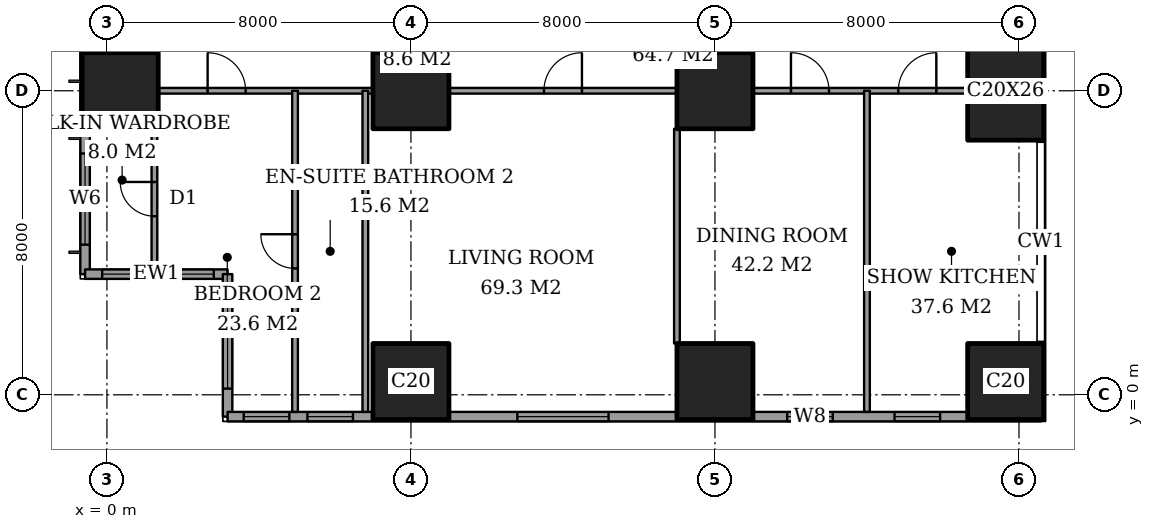
"""IFC4 building model, lengths in metres.
Left out: names, types, materials, properties, quantities, classifications, styles, units other than length and angle.
Written with IfcOpenShell. Run it as: python <this file> out.ifc"""

import sys

from ifc_helpers import new_model, si_unit, direction, frame, frame_2d, origin, origin_2d, place, context, subcontext, project, spatial, rectangle, extrude, element, fill, save


model = new_model("IFC4")
c1 = context("Model", 3, precision=1e-05, world=origin(), true_north=direction((0.0, 1.0)))
c2 = subcontext(c1, "Body", "Model", "MODEL_VIEW")
j1 = project(units=[si_unit("LENGTHUNIT", "METRE"), si_unit("PLANEANGLEUNIT", "RADIAN")], contexts=[c1])
p1 = place(None, origin())
s1 = spatial("IfcSite", under=j1, at=p1, CompositionType="ELEMENT")
p2 = place(p1, origin())
s2 = spatial("IfcBuilding", under=s1, at=p2, CompositionType="ELEMENT")
p3 = place(p2, frame((0.0, 0.0, 83.6)))
s3 = spatial("IfcBuildingStorey", under=s2, at=p3, CompositionType="ELEMENT", Elevation=83.6)
for number, where, z_axis, x_axis in (
    (1, (0.35, 8.0, 0.0), (0.0, 0.0, 1.0), (1.0, 0.0, 0.0)),
    (2, (8.0, 0.35, 0.0), (0.0, 0.0, 1.0), (1.0, 0.0, 0.0)),
    (3, (8.0, 8.0, 0.0), (0.0, 0.0, 1.0), (1.0, 0.0, 0.0)),
    (4, (16.0, 0.35, 0.0), (0.0, 0.0, 1.0), (1.0, 0.0, 0.0)),
    (5, (16.0, 8.0, 0.0), (0.0, 0.0, 1.0), (1.0, 0.0, 0.0)),
    (6, (23.65, 0.35, 0.0), (0.0, 0.0, 1.0), (1.0, 0.0, 0.0)),
):
    element("IfcColumn", number, at=place(p3, frame(where, z_axis=z_axis, x_axis=x_axis)), inside=s3, PredefinedType="COLUMN", context=c2, shape_type="SweptSolid", body=[
        extrude(rectangle(XDim=2.0, YDim=2.0, at=origin_2d()), origin(), (0.0, 0.0, 1.0), 3.6),
    ])
p4 = place(p3, frame((23.65, 8.0, 0.0), z_axis=(0.0, 0.0, 1.0), x_axis=(1.0, 0.0, 0.0)))
e7 = element("IfcColumn", 7, at=p4, inside=s3, PredefinedType="COLUMN", context=c2, shape_type="SweptSolid", body=[
    extrude(rectangle(XDim=2.0, YDim=2.6, at=origin_2d()), origin(), (0.0, 0.0, 1.0), 3.6),
])
p5 = place(p3, frame((-0.575, 44.825, 0.0), z_axis=(0.0, 0.0, 1.0), x_axis=(0.0, -1.0, 0.0)))
e8 = element("IfcWall", 8, at=p5, inside=s3, PredefinedType="SOLIDWALL", context=c2, shape_type="SweptSolid", body=[
    extrude(rectangle(XDim=41.65, YDim=0.25, at=frame_2d((20.825, 0.0))), origin(), (0.0, 0.0, 1.0), 3.6),
])
p6 = place(p5, frame((0.775, 0.0, 0.6)))
e9 = element("IfcOpeningElement", 9, at=p6, cuts=e8, PredefinedType="OPENING", context=c2, shape_type="SweptSolid", body=[
    extrude(rectangle(XDim=2.4, YDim=2.0, at=frame_2d((1.2, 1.0))), frame((0.0, 0.135, 0.0), z_axis=(0.0, -1.0, 0.0), x_axis=(1.0, 0.0, 0.0)), (0.0, 0.0, 1.0), 0.27),
])
p7 = place(p5, frame((6.1, 0.0, 0.6)))
e10 = element("IfcOpeningElement", 10, at=p7, cuts=e8, PredefinedType="OPENING", context=c2, shape_type="SweptSolid", body=[
    extrude(rectangle(XDim=1.2, YDim=2.0, at=frame_2d((0.6, 1.0))), frame((0.0, 0.135, 0.0), z_axis=(0.0, -1.0, 0.0), x_axis=(1.0, 0.0, 0.0)), (0.0, 0.0, 1.0), 0.27),
])
p8 = place(p5, frame((8.425, 0.0, 0.6)))
e11 = element("IfcOpeningElement", 11, at=p8, cuts=e8, PredefinedType="OPENING", context=c2, shape_type="SweptSolid", body=[
    extrude(rectangle(XDim=2.4, YDim=2.0, at=frame_2d((1.2, 1.0))), frame((0.0, 0.135, 0.0), z_axis=(0.0, -1.0, 0.0), x_axis=(1.0, 0.0, 0.0)), (0.0, 0.0, 1.0), 0.27),
])
p9 = place(p5, frame((15.625, 0.0, 0.6)))
e12 = element("IfcOpeningElement", 12, at=p9, cuts=e8, PredefinedType="OPENING", context=c2, shape_type="SweptSolid", body=[
    extrude(rectangle(XDim=2.4, YDim=2.0, at=frame_2d((1.2, 1.0))), frame((0.0, 0.135, 0.0), z_axis=(0.0, -1.0, 0.0), x_axis=(1.0, 0.0, 0.0)), (0.0, 0.0, 1.0), 0.27),
])
p10 = place(p5, frame((23.625, 0.0, 0.6)))
e13 = element("IfcOpeningElement", 13, at=p10, cuts=e8, PredefinedType="OPENING", context=c2, shape_type="SweptSolid", body=[
    extrude(rectangle(XDim=2.4, YDim=2.0, at=frame_2d((1.2, 1.0))), frame((0.0, 0.135, 0.0), z_axis=(0.0, -1.0, 0.0), x_axis=(1.0, 0.0, 0.0)), (0.0, 0.0, 1.0), 0.27),
])
p11 = place(p5, frame((30.825, 0.0, 0.6)))
e14 = element("IfcOpeningElement", 14, at=p11, cuts=e8, PredefinedType="OPENING", context=c2, shape_type="SweptSolid", body=[
    extrude(rectangle(XDim=2.4, YDim=2.0, at=frame_2d((1.2, 1.0))), frame((0.0, 0.135, 0.0), z_axis=(0.0, -1.0, 0.0), x_axis=(1.0, 0.0, 0.0)), (0.0, 0.0, 1.0), 0.27),
])
p12 = place(p5, frame((34.5, 0.0, 0.6)))
e15 = element("IfcOpeningElement", 15, at=p12, cuts=e8, PredefinedType="OPENING", context=c2, shape_type="SweptSolid", body=[
    extrude(rectangle(XDim=1.2, YDim=2.0, at=frame_2d((0.6, 1.0))), frame((0.0, 0.135, 0.0), z_axis=(0.0, -1.0, 0.0), x_axis=(1.0, 0.0, 0.0)), (0.0, 0.0, 1.0), 0.27),
])
p13 = place(p5, frame((38.475, 0.0, 0.6)))
e16 = element("IfcOpeningElement", 16, at=p13, cuts=e8, PredefinedType="OPENING", context=c2, shape_type="SweptSolid", body=[
    extrude(rectangle(XDim=2.4, YDim=2.0, at=frame_2d((1.2, 1.0))), frame((0.0, 0.135, 0.0), z_axis=(0.0, -1.0, 0.0), x_axis=(1.0, 0.0, 0.0)), (0.0, 0.0, 1.0), 0.27),
])
p14 = place(p3, frame((-0.575, 3.175, 0.0), z_axis=(0.0, 0.0, 1.0), x_axis=(1.0, 0.0, 0.0)))
e17 = element("IfcWall", 17, at=p14, inside=s3, PredefinedType="SOLIDWALL", context=c2, shape_type="SweptSolid", body=[
    extrude(rectangle(XDim=3.75, YDim=0.25, at=frame_2d((1.875, 0.0))), origin(), (0.0, 0.0, 1.0), 3.6),
])
p15 = place(p14, frame((0.45, 0.0, 0.6)))
e18 = element("IfcOpeningElement", 18, at=p15, cuts=e17, PredefinedType="OPENING", context=c2, shape_type="SweptSolid", body=[
    extrude(rectangle(XDim=1.2, YDim=2.0, at=frame_2d((0.6, 1.0))), frame((0.0, 0.135, 0.0), z_axis=(0.0, -1.0, 0.0), x_axis=(1.0, 0.0, 0.0)), (0.0, 0.0, 1.0), 0.27),
])
p16 = place(p14, frame((2.188, 0.0, 0.6)))
e19 = element("IfcOpeningElement", 19, at=p16, cuts=e17, PredefinedType="OPENING", context=c2, shape_type="SweptSolid", body=[
    extrude(rectangle(XDim=1.2, YDim=2.0, at=frame_2d((0.6, 1.0))), frame((0.0, 0.135, 0.0), z_axis=(0.0, -1.0, 0.0), x_axis=(1.0, 0.0, 0.0)), (0.0, 0.0, 1.0), 0.27),
])
p17 = place(p3, frame((3.175, 3.175, 0.0), z_axis=(0.0, 0.0, 1.0), x_axis=(0.0, -1.0, 0.0)))
e20 = element("IfcWall", 20, at=p17, inside=s3, PredefinedType="SOLIDWALL", context=c2, shape_type="SweptSolid", body=[
    extrude(rectangle(XDim=3.75, YDim=0.25, at=frame_2d((1.875, 0.0))), origin(), (0.0, 0.0, 1.0), 3.6),
])
p18 = place(p17, frame((0.613, 0.0, 0.6)))
e21 = element("IfcOpeningElement", 21, at=p18, cuts=e20, PredefinedType="OPENING", context=c2, shape_type="SweptSolid", body=[
    extrude(rectangle(XDim=2.4, YDim=2.0, at=frame_2d((1.2, 1.0))), frame((0.0, 0.135, 0.0), z_axis=(0.0, -1.0, 0.0), x_axis=(1.0, 0.0, 0.0)), (0.0, 0.0, 1.0), 0.27),
])
p19 = place(p3, frame((3.175, -0.575, 0.0), z_axis=(0.0, 0.0, 1.0), x_axis=(1.0, 0.0, 0.0)))
e22 = element("IfcWall", 22, at=p19, inside=s3, PredefinedType="SOLIDWALL", context=c2, shape_type="SweptSolid", body=[
    extrude(rectangle(XDim=21.4, YDim=0.25, at=frame_2d((10.7, 0.0))), origin(), (0.0, 0.0, 1.0), 3.6),
])
p20 = place(p19, frame((0.425, 0.0, 0.6)))
e23 = element("IfcOpeningElement", 23, at=p20, cuts=e22, PredefinedType="OPENING", context=c2, shape_type="SweptSolid", body=[
    extrude(rectangle(XDim=1.2, YDim=2.0, at=frame_2d((0.6, 1.0))), frame((0.0, 0.135, 0.0), z_axis=(0.0, -1.0, 0.0), x_axis=(1.0, 0.0, 0.0)), (0.0, 0.0, 1.0), 0.27),
])
p21 = place(p19, frame((2.1, 0.0, 0.6)))
e24 = element("IfcOpeningElement", 24, at=p21, cuts=e22, PredefinedType="OPENING", context=c2, shape_type="SweptSolid", body=[
    extrude(rectangle(XDim=1.2, YDim=2.0, at=frame_2d((0.6, 1.0))), frame((0.0, 0.135, 0.0), z_axis=(0.0, -1.0, 0.0), x_axis=(1.0, 0.0, 0.0)), (0.0, 0.0, 1.0), 0.27),
])
p22 = place(p19, frame((7.625, 0.0, 0.6)))
e25 = element("IfcOpeningElement", 25, at=p22, cuts=e22, PredefinedType="OPENING", context=c2, shape_type="SweptSolid", body=[
    extrude(rectangle(XDim=2.4, YDim=2.0, at=frame_2d((1.2, 1.0))), frame((0.0, 0.135, 0.0), z_axis=(0.0, -1.0, 0.0), x_axis=(1.0, 0.0, 0.0)), (0.0, 0.0, 1.0), 0.27),
])
p23 = place(p19, frame((14.725, 0.0, 0.6)))
e26 = element("IfcOpeningElement", 26, at=p23, cuts=e22, PredefinedType="OPENING", context=c2, shape_type="SweptSolid", body=[
    extrude(rectangle(XDim=1.2, YDim=2.0, at=frame_2d((0.6, 1.0))), frame((0.0, 0.135, 0.0), z_axis=(0.0, -1.0, 0.0), x_axis=(1.0, 0.0, 0.0)), (0.0, 0.0, 1.0), 0.27),
])
p24 = place(p19, frame((17.55, 0.0, 0.6)))
e27 = element("IfcOpeningElement", 27, at=p24, cuts=e22, PredefinedType="OPENING", context=c2, shape_type="SweptSolid", body=[
    extrude(rectangle(XDim=1.2, YDim=2.0, at=frame_2d((0.6, 1.0))), frame((0.0, 0.135, 0.0), z_axis=(0.0, -1.0, 0.0), x_axis=(1.0, 0.0, 0.0)), (0.0, 0.0, 1.0), 0.27),
])
p25 = place(p3, frame((1.35, 8.0, 0.0), z_axis=(0.0, 0.0, 1.0), x_axis=(1.0, 0.0, 0.0)))
e28 = element("IfcWall", 28, at=p25, inside=s3, PredefinedType="PARTITIONING", context=c2, shape_type="SweptSolid", body=[
    extrude(rectangle(XDim=5.65, YDim=0.15, at=frame_2d((2.825, 0.0))), origin(), (0.0, 0.0, 1.0), 3.35),
])
p26 = place(p25, frame((1.3, 0.0, 0.0)))
e29 = element("IfcOpeningElement", 29, at=p26, cuts=e28, PredefinedType="OPENING", context=c2, shape_type="SweptSolid", body=[
    extrude(rectangle(XDim=1.0, YDim=2.1, at=frame_2d((0.5, 1.05))), frame((0.0, 0.085, 0.0), z_axis=(0.0, -1.0, 0.0), x_axis=(1.0, 0.0, 0.0)), (0.0, 0.0, 1.0), 0.17),
])
p27 = place(p3, frame((9.0, 8.0, 0.0), z_axis=(0.0, 0.0, 1.0), x_axis=(1.0, 0.0, 0.0)))
e30 = element("IfcWall", 30, at=p27, inside=s3, PredefinedType="PARTITIONING", context=c2, shape_type="SweptSolid", body=[
    extrude(rectangle(XDim=6.0, YDim=0.15, at=frame_2d((3.0, 0.0))), origin(), (0.0, 0.0, 1.0), 3.35),
])
p28 = place(p27, frame((2.5, 0.0, 0.0)))
e31 = element("IfcOpeningElement", 31, at=p28, cuts=e30, PredefinedType="OPENING", context=c2, shape_type="SweptSolid", body=[
    extrude(rectangle(XDim=1.0, YDim=2.1, at=frame_2d((0.5, 1.05))), frame((0.0, 0.085, 0.0), z_axis=(0.0, -1.0, 0.0), x_axis=(1.0, 0.0, 0.0)), (0.0, 0.0, 1.0), 0.17),
])
p29 = place(p3, frame((17.0, 8.0, 0.0), z_axis=(0.0, 0.0, 1.0), x_axis=(1.0, 0.0, 0.0)))
e32 = element("IfcWall", 32, at=p29, inside=s3, PredefinedType="PARTITIONING", context=c2, shape_type="SweptSolid", body=[
    extrude(rectangle(XDim=5.65, YDim=0.15, at=frame_2d((2.825, 0.0))), origin(), (0.0, 0.0, 1.0), 3.35),
])
p30 = place(p29, frame((1.0, 0.0, 0.0)))
e33 = element("IfcOpeningElement", 33, at=p30, cuts=e32, PredefinedType="OPENING", context=c2, shape_type="SweptSolid", body=[
    extrude(rectangle(XDim=1.0, YDim=2.1, at=frame_2d((0.5, 1.05))), frame((0.0, 0.085, 0.0), z_axis=(0.0, -1.0, 0.0), x_axis=(1.0, 0.0, 0.0)), (0.0, 0.0, 1.0), 0.17),
])
p31 = place(p29, frame((3.825, 0.0, 0.0)))
e34 = element("IfcOpeningElement", 34, at=p31, cuts=e32, PredefinedType="OPENING", context=c2, shape_type="SweptSolid", body=[
    extrude(rectangle(XDim=1.0, YDim=2.1, at=frame_2d((0.5, 1.05))), frame((0.0, 0.085, 0.0), z_axis=(0.0, -1.0, 0.0), x_axis=(1.0, 0.0, 0.0)), (0.0, 0.0, 1.0), 0.17),
])
p32 = place(p3, frame((1.25, 3.3, 0.0), z_axis=(0.0, 0.0, 1.0), x_axis=(0.0, 1.0, 0.0)))
e35 = element("IfcWall", 35, at=p32, inside=s3, PredefinedType="PARTITIONING", context=c2, shape_type="SweptSolid", body=[
    extrude(rectangle(XDim=3.7, YDim=0.15, at=frame_2d((1.85, 0.0))), origin(), (0.0, 0.0, 1.0), 3.35),
])
p33 = place(p32, frame((1.4, 0.0, 0.0)))
e36 = element("IfcOpeningElement", 36, at=p33, cuts=e35, PredefinedType="OPENING", context=c2, shape_type="SweptSolid", body=[
    extrude(rectangle(XDim=0.9, YDim=2.1, at=frame_2d((0.45, 1.05))), frame((0.0, 0.085, 0.0), z_axis=(0.0, -1.0, 0.0), x_axis=(1.0, 0.0, 0.0)), (0.0, 0.0, 1.0), 0.17),
])
p34 = place(p3, frame((4.95, -0.45, 0.0), z_axis=(0.0, 0.0, 1.0), x_axis=(0.0, 1.0, 0.0)))
e37 = element("IfcWall", 37, at=p34, inside=s3, PredefinedType="PARTITIONING", context=c2, shape_type="SweptSolid", body=[
    extrude(rectangle(XDim=8.45, YDim=0.15, at=frame_2d((4.225, 0.0))), origin(), (0.0, 0.0, 1.0), 3.35),
])
p35 = place(p34, frame((3.775, 0.0, 0.0)))
e38 = element("IfcOpeningElement", 38, at=p35, cuts=e37, PredefinedType="OPENING", context=c2, shape_type="SweptSolid", body=[
    extrude(rectangle(XDim=0.9, YDim=2.1, at=frame_2d((0.45, 1.05))), frame((0.0, 0.085, 0.0), z_axis=(0.0, -1.0, 0.0), x_axis=(1.0, 0.0, 0.0)), (0.0, 0.0, 1.0), 0.17),
])
p36 = place(p3, frame((6.8, -0.45, 0.0), z_axis=(0.0, 0.0, 1.0), x_axis=(0.0, 1.0, 0.0)))
e39 = element("IfcWall", 39, at=p36, inside=s3, PredefinedType="PARTITIONING", context=c2, shape_type="SweptSolid", body=[
    extrude(rectangle(XDim=8.45, YDim=0.15, at=frame_2d((4.225, 0.0))), origin(), (0.0, 0.0, 1.0), 3.35),
])
p37 = place(p3, frame((15.0, 1.35, 0.0), z_axis=(0.0, 0.0, 1.0), x_axis=(0.0, 1.0, 0.0)))
e40 = element("IfcWall", 40, at=p37, inside=s3, PredefinedType="PARTITIONING", context=c2, shape_type="SweptSolid", body=[
    extrude(rectangle(XDim=5.65, YDim=0.15, at=frame_2d((2.825, 0.0))), origin(), (0.0, 0.0, 1.0), 3.35),
])
p38 = place(p3, frame((20.0, -0.45, 0.0), z_axis=(0.0, 0.0, 1.0), x_axis=(0.0, 1.0, 0.0)))
e41 = element("IfcWall", 41, at=p38, inside=s3, PredefinedType="PARTITIONING", context=c2, shape_type="SweptSolid", body=[
    extrude(rectangle(XDim=8.45, YDim=0.15, at=frame_2d((4.225, 0.0))), origin(), (0.0, 0.0, 1.0), 3.35),
])
p39 = place(p13, origin())
e42 = element("IfcWindow", 42, at=p39, inside=s3, PartitioningType="SINGLE_PANEL", PredefinedType="WINDOW", context=c2, shape_type="SweptSolid", body=[
    extrude(rectangle(XDim=2.4, YDim=2.0, at=frame_2d((1.2, 1.0))), frame((0.0, 0.03, 0.0), z_axis=(0.0, -1.0, 0.0), x_axis=(1.0, 0.0, 0.0)), (0.0, 0.0, 1.0), 0.06),
])
fill(e16, e42)
p40 = place(p15, origin())
e43 = element("IfcWindow", 43, at=p40, inside=s3, PartitioningType="SINGLE_PANEL", PredefinedType="WINDOW", context=c2, shape_type="SweptSolid", body=[
    extrude(rectangle(XDim=1.2, YDim=2.0, at=frame_2d((0.6, 1.0))), frame((0.0, 0.03, 0.0), z_axis=(0.0, -1.0, 0.0), x_axis=(1.0, 0.0, 0.0)), (0.0, 0.0, 1.0), 0.06),
])
fill(e18, e43)
p41 = place(p16, origin())
e44 = element("IfcWindow", 44, at=p41, inside=s3, PartitioningType="SINGLE_PANEL", PredefinedType="WINDOW", context=c2, shape_type="SweptSolid", body=[
    extrude(rectangle(XDim=1.2, YDim=2.0, at=frame_2d((0.6, 1.0))), frame((0.0, 0.03, 0.0), z_axis=(0.0, -1.0, 0.0), x_axis=(1.0, 0.0, 0.0)), (0.0, 0.0, 1.0), 0.06),
])
fill(e19, e44)
p42 = place(p18, origin())
e45 = element("IfcWindow", 45, at=p42, inside=s3, PartitioningType="SINGLE_PANEL", PredefinedType="WINDOW", context=c2, shape_type="SweptSolid", body=[
    extrude(rectangle(XDim=2.4, YDim=2.0, at=frame_2d((1.2, 1.0))), frame((0.0, 0.03, 0.0), z_axis=(0.0, -1.0, 0.0), x_axis=(1.0, 0.0, 0.0)), (0.0, 0.0, 1.0), 0.06),
])
fill(e21, e45)
p43 = place(p20, origin())
e46 = element("IfcWindow", 46, at=p43, inside=s3, PartitioningType="SINGLE_PANEL", PredefinedType="WINDOW", context=c2, shape_type="SweptSolid", body=[
    extrude(rectangle(XDim=1.2, YDim=2.0, at=frame_2d((0.6, 1.0))), frame((0.0, 0.03, 0.0), z_axis=(0.0, -1.0, 0.0), x_axis=(1.0, 0.0, 0.0)), (0.0, 0.0, 1.0), 0.06),
])
fill(e23, e46)
p44 = place(p21, origin())
e47 = element("IfcWindow", 47, at=p44, inside=s3, PartitioningType="SINGLE_PANEL", PredefinedType="WINDOW", context=c2, shape_type="SweptSolid", body=[
    extrude(rectangle(XDim=1.2, YDim=2.0, at=frame_2d((0.6, 1.0))), frame((0.0, 0.03, 0.0), z_axis=(0.0, -1.0, 0.0), x_axis=(1.0, 0.0, 0.0)), (0.0, 0.0, 1.0), 0.06),
])
fill(e24, e47)
p45 = place(p22, origin())
e48 = element("IfcWindow", 48, at=p45, inside=s3, PartitioningType="SINGLE_PANEL", PredefinedType="WINDOW", context=c2, shape_type="SweptSolid", body=[
    extrude(rectangle(XDim=2.4, YDim=2.0, at=frame_2d((1.2, 1.0))), frame((0.0, 0.03, 0.0), z_axis=(0.0, -1.0, 0.0), x_axis=(1.0, 0.0, 0.0)), (0.0, 0.0, 1.0), 0.06),
])
fill(e25, e48)
p46 = place(p23, origin())
e49 = element("IfcWindow", 49, at=p46, inside=s3, PartitioningType="SINGLE_PANEL", PredefinedType="WINDOW", context=c2, shape_type="SweptSolid", body=[
    extrude(rectangle(XDim=1.2, YDim=2.0, at=frame_2d((0.6, 1.0))), frame((0.0, 0.03, 0.0), z_axis=(0.0, -1.0, 0.0), x_axis=(1.0, 0.0, 0.0)), (0.0, 0.0, 1.0), 0.06),
])
fill(e26, e49)
p47 = place(p24, origin())
e50 = element("IfcWindow", 50, at=p47, inside=s3, PartitioningType="SINGLE_PANEL", PredefinedType="WINDOW", context=c2, shape_type="SweptSolid", body=[
    extrude(rectangle(XDim=1.2, YDim=2.0, at=frame_2d((0.6, 1.0))), frame((0.0, 0.03, 0.0), z_axis=(0.0, -1.0, 0.0), x_axis=(1.0, 0.0, 0.0)), (0.0, 0.0, 1.0), 0.06),
])
fill(e27, e50)
p48 = place(p33, origin())
e51 = element("IfcDoor", 51, at=p48, inside=s3, OperationType="SINGLE_SWING_LEFT", PredefinedType="DOOR", context=c2, shape_type="SweptSolid", body=[
    extrude(rectangle(XDim=0.9, YDim=2.1, at=frame_2d((0.45, 1.05))), frame((0.0, 0.025, 0.0), z_axis=(0.0, -1.0, 0.0), x_axis=(1.0, 0.0, 0.0)), (0.0, 0.0, 1.0), 0.05),
])
fill(e36, e51)
p49 = place(p26, origin())
e52 = element("IfcDoor", 52, at=p49, inside=s3, OperationType="SINGLE_SWING_RIGHT", PredefinedType="DOOR", context=c2, shape_type="SweptSolid", body=[
    extrude(rectangle(XDim=1.0, YDim=2.1, at=frame_2d((0.5, 1.05))), frame((0.0, 0.025, 0.0), z_axis=(0.0, -1.0, 0.0), x_axis=(1.0, 0.0, 0.0)), (0.0, 0.0, 1.0), 0.05),
])
fill(e29, e52)
p50 = place(p35, origin())
e53 = element("IfcDoor", 53, at=p50, inside=s3, OperationType="SINGLE_SWING_LEFT", PredefinedType="DOOR", context=c2, shape_type="SweptSolid", body=[
    extrude(rectangle(XDim=0.9, YDim=2.1, at=frame_2d((0.45, 1.05))), frame((0.0, 0.025, 0.0), z_axis=(0.0, -1.0, 0.0), x_axis=(1.0, 0.0, 0.0)), (0.0, 0.0, 1.0), 0.05),
])
fill(e38, e53)
p51 = place(p28, origin())
e54 = element("IfcDoor", 54, at=p51, inside=s3, OperationType="SINGLE_SWING_LEFT", PredefinedType="DOOR", context=c2, shape_type="SweptSolid", body=[
    extrude(rectangle(XDim=1.0, YDim=2.1, at=frame_2d((0.5, 1.05))), frame((0.0, 0.025, 0.0), z_axis=(0.0, -1.0, 0.0), x_axis=(1.0, 0.0, 0.0)), (0.0, 0.0, 1.0), 0.05),
])
fill(e31, e54)
p52 = place(p30, origin())
e55 = element("IfcDoor", 55, at=p52, inside=s3, OperationType="SINGLE_SWING_RIGHT", PredefinedType="DOOR", context=c2, shape_type="SweptSolid", body=[
    extrude(rectangle(XDim=1.0, YDim=2.1, at=frame_2d((0.5, 1.05))), frame((0.0, 0.025, 0.0), z_axis=(0.0, -1.0, 0.0), x_axis=(1.0, 0.0, 0.0)), (0.0, 0.0, 1.0), 0.05),
])
fill(e33, e55)
p53 = place(p31, origin())
e56 = element("IfcDoor", 56, at=p53, inside=s3, OperationType="SINGLE_SWING_LEFT", PredefinedType="DOOR", context=c2, shape_type="SweptSolid", body=[
    extrude(rectangle(XDim=1.0, YDim=2.1, at=frame_2d((0.5, 1.05))), frame((0.0, 0.025, 0.0), z_axis=(0.0, -1.0, 0.0), x_axis=(1.0, 0.0, 0.0)), (0.0, 0.0, 1.0), 0.05),
])
fill(e34, e56)
save(model, sys.argv[1])
